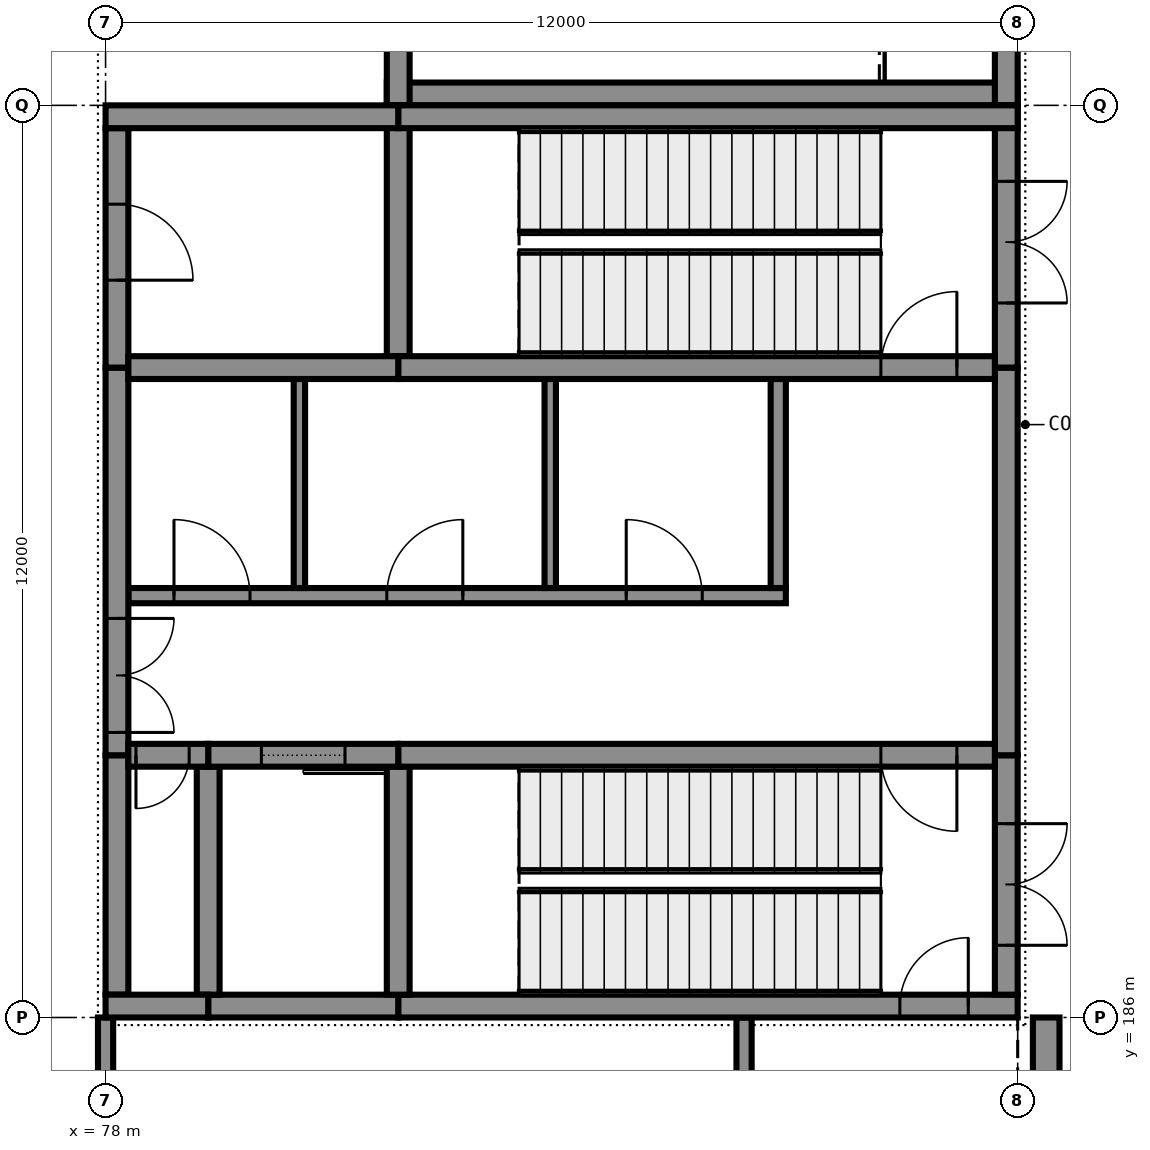
"""IFC4 building model, lengths in metres.
Left out: names, types, materials, properties, quantities, classifications, styles, units other than length and angle.
Written with IfcOpenShell. Run it as: python <this file> out.ifc"""

import sys

from ifc_helpers import new_model, si_unit, direction, frame, frame_2d, origin, place, context, subcontext, project, spatial, rectangle, extrude, element, fill, save


model = new_model("IFC4")
c1 = context("Model", 3, precision=1e-05, world=origin(), true_north=direction((0.0, 1.0)))
c2 = subcontext(c1, "Body", "Model", "MODEL_VIEW")
j1 = project(units=[si_unit("LENGTHUNIT", "METRE"), si_unit("PLANEANGLEUNIT", "RADIAN")], contexts=[c1])
p1 = place(None, origin())
s1 = spatial("IfcSite", under=j1, at=p1, CompositionType="ELEMENT")
p2 = place(p1, origin())
s2 = spatial("IfcBuilding", under=s1, at=p2, CompositionType="ELEMENT")
p3 = place(p2, origin())
s3 = spatial("IfcBuildingStorey", under=s2, at=p3, CompositionType="ELEMENT", Elevation=0.0)
p4 = place(p3, frame((90.0, 198.15, 0.0), z_axis=(0.0, 0.0, 1.0), x_axis=(-1.0, 0.0, 0.0)))
e1 = element("IfcWall", 1, at=p4, inside=s3, PredefinedType="SHEAR", context=c2, shape_type="SweptSolid", body=[
    extrude(rectangle(XDim=8.3, YDim=0.3, at=frame_2d((4.15, 0.0))), origin(), (0.0, 0.0, 1.0), 5.75),
])
p5 = place(p3, frame((89.85, 198.0, 0.0), z_axis=(0.0, 0.0, 1.0), x_axis=(0.0, 1.0, 0.0)))
e2 = element("IfcWall", 2, at=p5, inside=s3, PredefinedType="SHEAR", context=c2, shape_type="SweptSolid", body=[
    extrude(rectangle(XDim=3.3, YDim=0.3, at=frame_2d((1.65, 0.0))), origin(), (0.0, 0.0, 1.0), 5.75),
])
p6 = place(p5, frame((1.0, 0.0, 0.0)))
e3 = element("IfcOpeningElement", 3, at=p6, cuts=e2, PredefinedType="OPENING", context=c2, shape_type="SweptSolid", body=[
    extrude(rectangle(XDim=1.6, YDim=2.1, at=frame_2d((0.8, 1.05))), frame((0.0, 0.16, 0.0), z_axis=(0.0, -1.0, 0.0), x_axis=(1.0, 0.0, 0.0)), (0.0, 0.0, 1.0), 0.32),
])
p7 = place(p3, frame((81.85, 198.0, 0.0), z_axis=(0.0, 0.0, 1.0), x_axis=(0.0, 1.0, 0.0)))
e4 = element("IfcWall", 4, at=p7, inside=s3, PredefinedType="SHEAR", context=c2, shape_type="SweptSolid", body=[
    extrude(rectangle(XDim=3.3, YDim=0.3, at=frame_2d((1.65, 0.0))), origin(), (0.0, 0.0, 1.0), 5.75),
])
p8 = place(p3, frame((90.0, 186.15, 0.0), z_axis=(0.0, 0.0, 1.0), x_axis=(-1.0, 0.0, 0.0)))
e5 = element("IfcWall", 5, at=p8, inside=s3, PredefinedType="SHEAR", context=c2, shape_type="SweptSolid", body=[
    extrude(rectangle(XDim=8.15, YDim=0.3, at=frame_2d((4.075, 0.0))), origin(), (0.0, 0.0, 1.0), 5.75),
])
p9 = place(p8, frame((0.65, 0.0, 0.0)))
e6 = element("IfcOpeningElement", 6, at=p9, cuts=e5, PredefinedType="OPENING", context=c2, shape_type="SweptSolid", body=[
    extrude(rectangle(XDim=0.9, YDim=2.1, at=frame_2d((0.45, 1.05))), frame((0.0, 0.16, 0.0), z_axis=(0.0, -1.0, 0.0), x_axis=(1.0, 0.0, 0.0)), (0.0, 0.0, 1.0), 0.32),
])
p10 = place(p3, frame((81.85, 186.15, 0.0), z_axis=(0.0, 0.0, 1.0), x_axis=(-1.0, 0.0, 0.0)))
e7 = element("IfcWall", 7, at=p10, inside=s3, PredefinedType="SHEAR", context=c2, shape_type="SweptSolid", body=[
    extrude(rectangle(XDim=2.5, YDim=0.3, at=frame_2d((1.25, 0.0))), origin(), (0.0, 0.0, 1.0), 5.75),
])
p11 = place(p3, frame((79.35, 186.15, 0.0), z_axis=(0.0, 0.0, 1.0), x_axis=(-1.0, 0.0, 0.0)))
e8 = element("IfcWall", 8, at=p11, inside=s3, PredefinedType="SHEAR", context=c2, shape_type="SweptSolid", body=[
    extrude(rectangle(XDim=1.35, YDim=0.3, at=frame_2d((0.675, 0.0))), origin(), (0.0, 0.0, 1.0), 5.75),
])
p12 = place(p3, frame((90.0, 197.85, 0.0), z_axis=(0.0, 0.0, 1.0), x_axis=(-1.0, 0.0, 0.0)))
e9 = element("IfcWall", 9, at=p12, inside=s3, PredefinedType="SHEAR", context=c2, shape_type="SweptSolid", body=[
    extrude(rectangle(XDim=8.15, YDim=0.3, at=frame_2d((4.075, 0.0))), origin(), (0.0, 0.0, 1.0), 5.75),
])
p13 = place(p3, frame((81.85, 197.85, 0.0), z_axis=(0.0, 0.0, 1.0), x_axis=(-1.0, 0.0, 0.0)))
e10 = element("IfcWall", 10, at=p13, inside=s3, PredefinedType="SHEAR", context=c2, shape_type="SweptSolid", body=[
    extrude(rectangle(XDim=3.85, YDim=0.3, at=frame_2d((1.925, 0.0))), origin(), (0.0, 0.0, 1.0), 5.75),
])
p14 = place(p3, frame((89.7, 189.45, 0.0), z_axis=(0.0, 0.0, 1.0), x_axis=(-1.0, 0.0, 0.0)))
e11 = element("IfcWall", 11, at=p14, inside=s3, PredefinedType="SHEAR", context=c2, shape_type="SweptSolid", body=[
    extrude(rectangle(XDim=7.85, YDim=0.3, at=frame_2d((3.925, 0.0))), origin(), (0.0, 0.0, 1.0), 5.75),
])
p15 = place(p14, frame((0.5, 0.0, 0.0)))
e12 = element("IfcOpeningElement", 12, at=p15, cuts=e11, PredefinedType="OPENING", context=c2, shape_type="SweptSolid", body=[
    extrude(rectangle(XDim=1.0, YDim=2.1, at=frame_2d((0.5, 1.05))), frame((0.0, 0.16, 0.0), z_axis=(0.0, -1.0, 0.0), x_axis=(1.0, 0.0, 0.0)), (0.0, 0.0, 1.0), 0.32),
])
p16 = place(p3, frame((81.85, 189.45, 0.0), z_axis=(0.0, 0.0, 1.0), x_axis=(-1.0, 0.0, 0.0)))
e13 = element("IfcWall", 13, at=p16, inside=s3, PredefinedType="SHEAR", context=c2, shape_type="SweptSolid", body=[
    extrude(rectangle(XDim=2.5, YDim=0.3, at=frame_2d((1.25, 0.0))), origin(), (0.0, 0.0, 1.0), 5.75),
])
p17 = place(p16, frame((0.7, 0.0, 0.0)))
e14 = element("IfcOpeningElement", 14, at=p17, cuts=e13, PredefinedType="OPENING", context=c2, shape_type="SweptSolid", body=[
    extrude(rectangle(XDim=1.1, YDim=2.1, at=frame_2d((0.55, 1.05))), frame((0.0, 0.16, 0.0), z_axis=(0.0, -1.0, 0.0), x_axis=(1.0, 0.0, 0.0)), (0.0, 0.0, 1.0), 0.32),
])
p18 = place(p3, frame((79.35, 189.45, 0.0), z_axis=(0.0, 0.0, 1.0), x_axis=(-1.0, 0.0, 0.0)))
e15 = element("IfcWall", 15, at=p18, inside=s3, PredefinedType="SHEAR", context=c2, shape_type="SweptSolid", body=[
    extrude(rectangle(XDim=1.05, YDim=0.3, at=frame_2d((0.525, 0.0))), origin(), (0.0, 0.0, 1.0), 5.75),
])
p19 = place(p18, frame((0.25, 0.0, 0.0)))
e16 = element("IfcOpeningElement", 16, at=p19, cuts=e15, PredefinedType="OPENING", context=c2, shape_type="SweptSolid", body=[
    extrude(rectangle(XDim=0.7, YDim=2.1, at=frame_2d((0.35, 1.05))), frame((0.0, 0.16, 0.0), z_axis=(0.0, -1.0, 0.0), x_axis=(1.0, 0.0, 0.0)), (0.0, 0.0, 1.0), 0.32),
])
p20 = place(p3, frame((89.7, 194.55, 0.0), z_axis=(0.0, 0.0, 1.0), x_axis=(-1.0, 0.0, 0.0)))
e17 = element("IfcWall", 17, at=p20, inside=s3, PredefinedType="SHEAR", context=c2, shape_type="SweptSolid", body=[
    extrude(rectangle(XDim=7.85, YDim=0.3, at=frame_2d((3.925, 0.0))), origin(), (0.0, 0.0, 1.0), 5.75),
])
p21 = place(p20, frame((0.5, 0.0, 0.0)))
e18 = element("IfcOpeningElement", 18, at=p21, cuts=e17, PredefinedType="OPENING", context=c2, shape_type="SweptSolid", body=[
    extrude(rectangle(XDim=1.0, YDim=2.1, at=frame_2d((0.5, 1.05))), frame((0.0, 0.16, 0.0), z_axis=(0.0, -1.0, 0.0), x_axis=(1.0, 0.0, 0.0)), (0.0, 0.0, 1.0), 0.32),
])
p22 = place(p3, frame((81.85, 194.55, 0.0), z_axis=(0.0, 0.0, 1.0), x_axis=(-1.0, 0.0, 0.0)))
e19 = element("IfcWall", 19, at=p22, inside=s3, PredefinedType="SHEAR", context=c2, shape_type="SweptSolid", body=[
    extrude(rectangle(XDim=3.55, YDim=0.3, at=frame_2d((1.775, 0.0))), origin(), (0.0, 0.0, 1.0), 5.75),
])
p23 = place(p3, frame((89.85, 186.3, 0.0), z_axis=(0.0, 0.0, 1.0), x_axis=(0.0, 1.0, 0.0)))
e20 = element("IfcWall", 20, at=p23, inside=s3, PredefinedType="SHEAR", context=c2, shape_type="SweptSolid", body=[
    extrude(rectangle(XDim=3.15, YDim=0.3, at=frame_2d((1.575, 0.0))), origin(), (0.0, 0.0, 1.0), 5.75),
])
p24 = place(p23, frame((0.65, 0.0, 0.0)))
e21 = element("IfcOpeningElement", 21, at=p24, cuts=e20, PredefinedType="OPENING", context=c2, shape_type="SweptSolid", body=[
    extrude(rectangle(XDim=1.6, YDim=2.1, at=frame_2d((0.8, 1.05))), frame((0.0, 0.16, 0.0), z_axis=(0.0, -1.0, 0.0), x_axis=(1.0, 0.0, 0.0)), (0.0, 0.0, 1.0), 0.32),
])
p25 = place(p3, frame((89.85, 189.45, 0.0), z_axis=(0.0, 0.0, 1.0), x_axis=(0.0, 1.0, 0.0)))
e22 = element("IfcWall", 22, at=p25, inside=s3, PredefinedType="SHEAR", context=c2, shape_type="SweptSolid", body=[
    extrude(rectangle(XDim=5.1, YDim=0.3, at=frame_2d((2.55, 0.0))), origin(), (0.0, 0.0, 1.0), 5.75),
])
p26 = place(p3, frame((89.85, 194.55, 0.0), z_axis=(0.0, 0.0, 1.0), x_axis=(0.0, 1.0, 0.0)))
e23 = element("IfcWall", 23, at=p26, inside=s3, PredefinedType="SHEAR", context=c2, shape_type="SweptSolid", body=[
    extrude(rectangle(XDim=3.45, YDim=0.3, at=frame_2d((1.725, 0.0))), origin(), (0.0, 0.0, 1.0), 5.75),
])
p27 = place(p26, frame((0.85, 0.0, 0.0)))
e24 = element("IfcOpeningElement", 24, at=p27, cuts=e23, PredefinedType="OPENING", context=c2, shape_type="SweptSolid", body=[
    extrude(rectangle(XDim=1.6, YDim=2.1, at=frame_2d((0.8, 1.05))), frame((0.0, 0.16, 0.0), z_axis=(0.0, -1.0, 0.0), x_axis=(1.0, 0.0, 0.0)), (0.0, 0.0, 1.0), 0.32),
])
p28 = place(p3, frame((78.15, 186.3, 0.0), z_axis=(0.0, 0.0, 1.0), x_axis=(0.0, 1.0, 0.0)))
e25 = element("IfcWall", 25, at=p28, inside=s3, PredefinedType="SHEAR", context=c2, shape_type="SweptSolid", body=[
    extrude(rectangle(XDim=3.15, YDim=0.3, at=frame_2d((1.575, 0.0))), origin(), (0.0, 0.0, 1.0), 5.75),
])
p29 = place(p3, frame((78.15, 189.45, 0.0), z_axis=(0.0, 0.0, 1.0), x_axis=(0.0, 1.0, 0.0)))
e26 = element("IfcWall", 26, at=p29, inside=s3, PredefinedType="SHEAR", context=c2, shape_type="SweptSolid", body=[
    extrude(rectangle(XDim=5.1, YDim=0.3, at=frame_2d((2.55, 0.0))), origin(), (0.0, 0.0, 1.0), 5.75),
])
p30 = place(p29, frame((0.3, 0.0, 0.0)))
e27 = element("IfcOpeningElement", 27, at=p30, cuts=e26, PredefinedType="OPENING", context=c2, shape_type="SweptSolid", body=[
    extrude(rectangle(XDim=1.5, YDim=2.1, at=frame_2d((0.75, 1.05))), frame((0.0, 0.16, 0.0), z_axis=(0.0, -1.0, 0.0), x_axis=(1.0, 0.0, 0.0)), (0.0, 0.0, 1.0), 0.32),
])
p31 = place(p3, frame((78.15, 194.55, 0.0), z_axis=(0.0, 0.0, 1.0), x_axis=(0.0, 1.0, 0.0)))
e28 = element("IfcWall", 28, at=p31, inside=s3, PredefinedType="SHEAR", context=c2, shape_type="SweptSolid", body=[
    extrude(rectangle(XDim=3.15, YDim=0.3, at=frame_2d((1.575, 0.0))), origin(), (0.0, 0.0, 1.0), 5.75),
])
p32 = place(p31, frame((1.15, 0.0, 0.0)))
e29 = element("IfcOpeningElement", 29, at=p32, cuts=e28, PredefinedType="OPENING", context=c2, shape_type="SweptSolid", body=[
    extrude(rectangle(XDim=1.0, YDim=2.1, at=frame_2d((0.5, 1.05))), frame((0.0, 0.16, 0.0), z_axis=(0.0, -1.0, 0.0), x_axis=(1.0, 0.0, 0.0)), (0.0, 0.0, 1.0), 0.32),
])
p33 = place(p3, frame((81.85, 186.3, 0.0), z_axis=(0.0, 0.0, 1.0), x_axis=(0.0, 1.0, 0.0)))
e30 = element("IfcWall", 30, at=p33, inside=s3, PredefinedType="SHEAR", context=c2, shape_type="SweptSolid", body=[
    extrude(rectangle(XDim=3.0, YDim=0.3, at=frame_2d((1.5, 0.0))), origin(), (0.0, 0.0, 1.0), 5.75),
])
p34 = place(p3, frame((81.85, 194.7, 0.0), z_axis=(0.0, 0.0, 1.0), x_axis=(0.0, 1.0, 0.0)))
e31 = element("IfcWall", 31, at=p34, inside=s3, PredefinedType="SHEAR", context=c2, shape_type="SweptSolid", body=[
    extrude(rectangle(XDim=3.3, YDim=0.3, at=frame_2d((1.65, 0.0))), origin(), (0.0, 0.0, 1.0), 5.75),
])
p35 = place(p3, frame((79.35, 186.3, 0.0), z_axis=(0.0, 0.0, 1.0), x_axis=(0.0, 1.0, 0.0)))
e32 = element("IfcWall", 32, at=p35, inside=s3, PredefinedType="SHEAR", context=c2, shape_type="SweptSolid", body=[
    extrude(rectangle(XDim=3.0, YDim=0.3, at=frame_2d((1.5, 0.0))), origin(), (0.0, 0.0, 1.0), 5.75),
])
p36 = place(p3, frame((90.375, 174.5, 0.0), z_axis=(0.0, 0.0, 1.0), x_axis=(0.0, 1.0, 0.0)))
e33 = element("IfcWall", 33, at=p36, inside=s3, PredefinedType="STANDARD", context=c2, shape_type="SweptSolid", body=[
    extrude(rectangle(XDim=11.5, YDim=0.35, at=frame_2d((5.75, 0.0))), origin(), (0.0, 0.0, 1.0), 6.0),
])
p37 = place(p36, frame((0.1, 0.0, 0.0)))
e34 = element("IfcOpeningElement", 34, at=p37, cuts=e33, PredefinedType="OPENING", context=c2, shape_type="SweptSolid", body=[
    extrude(rectangle(XDim=4.8, YDim=2.4, at=frame_2d((2.4, 1.2))), frame((0.0, 0.185, 0.0), z_axis=(0.0, -1.0, 0.0), x_axis=(1.0, 0.0, 0.0)), (0.0, 0.0, 1.0), 0.37),
])
p38 = place(p3, frame((78.3, 191.55, 0.0), z_axis=(0.0, 0.0, 1.0), x_axis=(1.0, 0.0, 0.0)))
e35 = element("IfcWall", 35, at=p38, inside=s3, PredefinedType="PARTITIONING", context=c2, shape_type="SweptSolid", body=[
    extrude(rectangle(XDim=8.65, YDim=0.2, at=frame_2d((4.325, 0.0))), origin(), (0.0, 0.0, 1.0), 5.75),
])
p39 = place(p38, frame((0.6, 0.0, 0.0)))
e36 = element("IfcOpeningElement", 36, at=p39, cuts=e35, PredefinedType="OPENING", context=c2, shape_type="SweptSolid", body=[
    extrude(rectangle(XDim=1.0, YDim=2.1, at=frame_2d((0.5, 1.05))), frame((0.0, 0.11, 0.0), z_axis=(0.0, -1.0, 0.0), x_axis=(1.0, 0.0, 0.0)), (0.0, 0.0, 1.0), 0.22),
])
p40 = place(p38, frame((3.4, 0.0, 0.0)))
e37 = element("IfcOpeningElement", 37, at=p40, cuts=e35, PredefinedType="OPENING", context=c2, shape_type="SweptSolid", body=[
    extrude(rectangle(XDim=1.0, YDim=2.1, at=frame_2d((0.5, 1.05))), frame((0.0, 0.11, 0.0), z_axis=(0.0, -1.0, 0.0), x_axis=(1.0, 0.0, 0.0)), (0.0, 0.0, 1.0), 0.22),
])
p41 = place(p38, frame((6.55, 0.0, 0.0)))
e38 = element("IfcOpeningElement", 38, at=p41, cuts=e35, PredefinedType="OPENING", context=c2, shape_type="SweptSolid", body=[
    extrude(rectangle(XDim=1.0, YDim=2.1, at=frame_2d((0.5, 1.05))), frame((0.0, 0.11, 0.0), z_axis=(0.0, -1.0, 0.0), x_axis=(1.0, 0.0, 0.0)), (0.0, 0.0, 1.0), 0.22),
])
p42 = place(p3, frame((78.0, 180.1, 0.0), z_axis=(0.0, 0.0, 1.0), x_axis=(0.0, 1.0, 0.0)))
e39 = element("IfcWall", 39, at=p42, inside=s3, PredefinedType="PARTITIONING", context=c2, shape_type="SweptSolid", body=[
    extrude(rectangle(XDim=5.9, YDim=0.2, at=frame_2d((2.95, 0.0))), origin(), (0.0, 0.0, 1.0), 4.75),
])
for number, where, z_axis, x_axis in (
    (40, (80.55, 191.65, 0.0), (0.0, 0.0, 1.0), (0.0, 1.0, 0.0)),
    (41, (83.85, 191.65, 0.0), (0.0, 0.0, 1.0), (0.0, 1.0, 0.0)),
):
    element("IfcWall", number, at=place(p3, frame(where, z_axis=z_axis, x_axis=x_axis)), inside=s3, PredefinedType="PARTITIONING", context=c2, shape_type="SweptSolid", body=[
        extrude(rectangle(XDim=2.75, YDim=0.15, at=frame_2d((1.375, 0.0))), origin(), (0.0, 0.0, 1.0), 5.75),
    ])
p43 = place(p3, frame((86.4, 180.1, 0.0), z_axis=(0.0, 0.0, 1.0), x_axis=(0.0, 1.0, 0.0)))
e42 = element("IfcWall", 42, at=p43, inside=s3, PredefinedType="PARTITIONING", context=c2, shape_type="SweptSolid", body=[
    extrude(rectangle(XDim=5.9, YDim=0.2, at=frame_2d((2.95, 0.0))), origin(), (0.0, 0.0, 1.0), 5.75),
])
p44 = place(p43, frame((2.4, 0.0, 0.0)))
e43 = element("IfcOpeningElement", 43, at=p44, cuts=e42, PredefinedType="OPENING", context=c2, shape_type="SweptSolid", body=[
    extrude(rectangle(XDim=1.0, YDim=2.1, at=frame_2d((0.5, 1.05))), frame((0.0, 0.11, 0.0), z_axis=(0.0, -1.0, 0.0), x_axis=(1.0, 0.0, 0.0)), (0.0, 0.0, 1.0), 0.22),
])
p45 = place(p3, frame((86.85, 191.65, 0.0), z_axis=(0.0, 0.0, 1.0), x_axis=(0.0, 1.0, 0.0)))
e44 = element("IfcWall", 44, at=p45, inside=s3, PredefinedType="PARTITIONING", context=c2, shape_type="SweptSolid", body=[
    extrude(rectangle(XDim=2.75, YDim=0.2, at=frame_2d((1.375, 0.0))), origin(), (0.0, 0.0, 1.0), 5.75),
])
p46 = place(p9, frame((0.9, 0.0, 0.0), z_axis=(0.0, 0.0, 1.0), x_axis=(-1.0, 0.0, 0.0)))
e45 = element("IfcDoor", 45, at=p46, inside=s3, OperationType="SINGLE_SWING_LEFT", PredefinedType="DOOR", context=c2, shape_type="SweptSolid", body=[
    extrude(rectangle(XDim=0.9, YDim=2.1, at=frame_2d((0.45, 1.05))), frame((0.0, 0.025, 0.0), z_axis=(0.0, -1.0, 0.0), x_axis=(1.0, 0.0, 0.0)), (0.0, 0.0, 1.0), 0.05),
])
fill(e6, e45)
p47 = place(p24, frame((1.6, 0.0, 0.0), z_axis=(0.0, 0.0, 1.0), x_axis=(-1.0, 0.0, 0.0)))
e46 = element("IfcDoor", 46, at=p47, inside=s3, OperationType="DOUBLE_DOOR_SINGLE_SWING", PredefinedType="DOOR", context=c2, shape_type="SweptSolid", body=[
    extrude(rectangle(XDim=1.6, YDim=2.1, at=frame_2d((0.8, 1.05))), frame((0.0, 0.025, 0.0), z_axis=(0.0, -1.0, 0.0), x_axis=(1.0, 0.0, 0.0)), (0.0, 0.0, 1.0), 0.05),
])
fill(e21, e46)
p48 = place(p19, origin())
e47 = element("IfcDoor", 47, at=p48, inside=s3, OperationType="SINGLE_SWING_LEFT", PredefinedType="DOOR", context=c2, shape_type="SweptSolid", body=[
    extrude(rectangle(XDim=0.7, YDim=2.1, at=frame_2d((0.35, 1.05))), frame((0.0, 0.025, 0.0), z_axis=(0.0, -1.0, 0.0), x_axis=(1.0, 0.0, 0.0)), (0.0, 0.0, 1.0), 0.05),
])
fill(e16, e47)
p49 = place(p17, origin())
e48 = element("IfcDoor", 48, at=p49, inside=s3, OperationType="SLIDING_TO_LEFT", PredefinedType="DOOR", context=c2, shape_type="SweptSolid", body=[
    extrude(rectangle(XDim=1.1, YDim=2.1, at=frame_2d((0.55, 1.05))), frame((0.0, 0.025, 0.0), z_axis=(0.0, -1.0, 0.0), x_axis=(1.0, 0.0, 0.0)), (0.0, 0.0, 1.0), 0.05),
])
fill(e14, e48)
p50 = place(p15, origin())
e49 = element("IfcDoor", 49, at=p50, inside=s3, OperationType="SINGLE_SWING_RIGHT", PredefinedType="DOOR", context=c2, shape_type="SweptSolid", body=[
    extrude(rectangle(XDim=1.0, YDim=2.1, at=frame_2d((0.5, 1.05))), frame((0.0, 0.025, 0.0), z_axis=(0.0, -1.0, 0.0), x_axis=(1.0, 0.0, 0.0)), (0.0, 0.0, 1.0), 0.05),
])
fill(e12, e49)
p51 = place(p30, frame((1.5, 0.0, 0.0), z_axis=(0.0, 0.0, 1.0), x_axis=(-1.0, 0.0, 0.0)))
e50 = element("IfcDoor", 50, at=p51, inside=s3, OperationType="DOUBLE_DOOR_SINGLE_SWING", PredefinedType="DOOR", context=c2, shape_type="SweptSolid", body=[
    extrude(rectangle(XDim=1.5, YDim=2.1, at=frame_2d((0.75, 1.05))), frame((0.0, 0.025, 0.0), z_axis=(0.0, -1.0, 0.0), x_axis=(1.0, 0.0, 0.0)), (0.0, 0.0, 1.0), 0.05),
])
fill(e27, e50)
p52 = place(p39, origin())
e51 = element("IfcDoor", 51, at=p52, inside=s3, OperationType="SINGLE_SWING_RIGHT", PredefinedType="DOOR", context=c2, shape_type="SweptSolid", body=[
    extrude(rectangle(XDim=1.0, YDim=2.1, at=frame_2d((0.5, 1.05))), frame((0.0, 0.025, 0.0), z_axis=(0.0, -1.0, 0.0), x_axis=(1.0, 0.0, 0.0)), (0.0, 0.0, 1.0), 0.05),
])
fill(e36, e51)
p53 = place(p40, origin())
e52 = element("IfcDoor", 52, at=p53, inside=s3, OperationType="SINGLE_SWING_LEFT", PredefinedType="DOOR", context=c2, shape_type="SweptSolid", body=[
    extrude(rectangle(XDim=1.0, YDim=2.1, at=frame_2d((0.5, 1.05))), frame((0.0, 0.025, 0.0), z_axis=(0.0, -1.0, 0.0), x_axis=(1.0, 0.0, 0.0)), (0.0, 0.0, 1.0), 0.05),
])
fill(e37, e52)
p54 = place(p41, origin())
e53 = element("IfcDoor", 53, at=p54, inside=s3, OperationType="SINGLE_SWING_RIGHT", PredefinedType="DOOR", context=c2, shape_type="SweptSolid", body=[
    extrude(rectangle(XDim=1.0, YDim=2.1, at=frame_2d((0.5, 1.05))), frame((0.0, 0.025, 0.0), z_axis=(0.0, -1.0, 0.0), x_axis=(1.0, 0.0, 0.0)), (0.0, 0.0, 1.0), 0.05),
])
fill(e38, e53)
p55 = place(p21, frame((1.0, 0.0, 0.0), z_axis=(0.0, 0.0, 1.0), x_axis=(-1.0, 0.0, 0.0)))
e54 = element("IfcDoor", 54, at=p55, inside=s3, OperationType="SINGLE_SWING_LEFT", PredefinedType="DOOR", context=c2, shape_type="SweptSolid", body=[
    extrude(rectangle(XDim=1.0, YDim=2.1, at=frame_2d((0.5, 1.05))), frame((0.0, 0.025, 0.0), z_axis=(0.0, -1.0, 0.0), x_axis=(1.0, 0.0, 0.0)), (0.0, 0.0, 1.0), 0.05),
])
fill(e18, e54)
p56 = place(p32, frame((1.0, 0.0, 0.0), z_axis=(0.0, 0.0, 1.0), x_axis=(-1.0, 0.0, 0.0)))
e55 = element("IfcDoor", 55, at=p56, inside=s3, OperationType="SINGLE_SWING_LEFT", PredefinedType="DOOR", context=c2, shape_type="SweptSolid", body=[
    extrude(rectangle(XDim=1.0, YDim=2.1, at=frame_2d((0.5, 1.05))), frame((0.0, 0.025, 0.0), z_axis=(0.0, -1.0, 0.0), x_axis=(1.0, 0.0, 0.0)), (0.0, 0.0, 1.0), 0.05),
])
fill(e29, e55)
p57 = place(p27, frame((1.6, 0.0, 0.0), z_axis=(0.0, 0.0, 1.0), x_axis=(-1.0, 0.0, 0.0)))
e56 = element("IfcDoor", 56, at=p57, inside=s3, OperationType="DOUBLE_DOOR_SINGLE_SWING", PredefinedType="DOOR", context=c2, shape_type="SweptSolid", body=[
    extrude(rectangle(XDim=1.6, YDim=2.1, at=frame_2d((0.8, 1.05))), frame((0.0, 0.025, 0.0), z_axis=(0.0, -1.0, 0.0), x_axis=(1.0, 0.0, 0.0)), (0.0, 0.0, 1.0), 0.05),
])
fill(e24, e56)
save(model, sys.argv[1])
